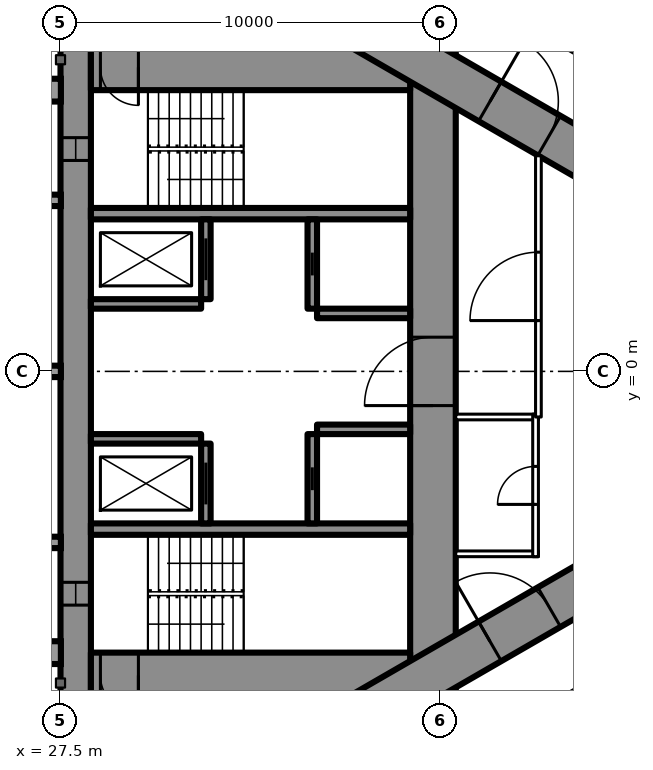
"""IFC4 building model, lengths in metres.
Left out: names, types, materials, properties, quantities, classifications, styles, units other than length and angle.
Written with IfcOpenShell. Run it as: python <this file> out.ifc"""

import sys

from ifc_helpers import new_model, si_unit, direction, frame, frame_2d, origin, place, context, subcontext, project, spatial, rectangle, extrude, element, fill, save


model = new_model("IFC4")
c1 = context("Model", 3, precision=1e-05, world=origin(), true_north=direction((0.0, 1.0)))
c2 = subcontext(c1, "Body", "Model", "MODEL_VIEW")
j1 = project(units=[si_unit("LENGTHUNIT", "METRE"), si_unit("PLANEANGLEUNIT", "RADIAN")], contexts=[c1])
p1 = place(None, origin())
s1 = spatial("IfcSite", under=j1, at=p1, CompositionType="ELEMENT")
p2 = place(p1, origin())
s2 = spatial("IfcBuilding", under=s1, at=p2, CompositionType="ELEMENT")
p3 = place(p2, frame((0.0, 0.0, 39.0)))
s3 = spatial("IfcBuildingStorey", under=s2, at=p3, CompositionType="ELEMENT", Elevation=39.0)
p4 = place(p3, frame((27.9, -8.6, 0.0), z_axis=(0.0, 0.0, 1.0), x_axis=(0.0, 1.0, 0.0)))
e1 = element("IfcWall", 1, at=p4, inside=s3, PredefinedType="SHEAR", context=c2, shape_type="SweptSolid", body=[
    extrude(rectangle(XDim=17.2, YDim=0.8, at=frame_2d((8.6, 0.0))), origin(), (0.0, 0.0, 1.0), 3.5),
])
p5 = place(p4, frame((2.45, 0.0, 0.6)))
e2 = element("IfcOpeningElement", 2, at=p5, cuts=e1, PredefinedType="OPENING", context=c2, shape_type="SweptSolid", body=[
    extrude(rectangle(XDim=0.6, YDim=2.1, at=frame_2d((0.3, 1.05))), frame((0.0, 0.41, 0.0), z_axis=(0.0, -1.0, 0.0), x_axis=(1.0, 0.0, 0.0)), (0.0, 0.0, 1.0), 0.82),
])
p6 = place(p4, frame((14.15, 0.0, 0.6)))
e3 = element("IfcOpeningElement", 3, at=p6, cuts=e1, PredefinedType="OPENING", context=c2, shape_type="SweptSolid", body=[
    extrude(rectangle(XDim=0.6, YDim=2.1, at=frame_2d((0.3, 1.05))), frame((0.0, 0.41, 0.0), z_axis=(0.0, -1.0, 0.0), x_axis=(1.0, 0.0, 0.0)), (0.0, 0.0, 1.0), 0.82),
])
p7 = place(p3, frame((37.3, -8.6, 0.0), z_axis=(0.0, 0.0, 1.0), x_axis=(0.0, 1.0, 0.0)))
e4 = element("IfcWall", 4, at=p7, inside=s3, PredefinedType="SHEAR", context=c2, shape_type="SweptSolid", body=[
    extrude(rectangle(XDim=17.2, YDim=1.2, at=frame_2d((8.6, 0.0))), origin(), (0.0, 0.0, 1.0), 3.5),
])
p8 = place(p7, frame((7.7, 0.0, 0.0)))
e5 = element("IfcOpeningElement", 5, at=p8, cuts=e4, PredefinedType="OPENING", context=c2, shape_type="SweptSolid", body=[
    extrude(rectangle(XDim=1.8, YDim=2.2, at=frame_2d((0.9, 1.1))), frame((0.0, 0.61, 0.0), z_axis=(0.0, -1.0, 0.0), x_axis=(1.0, 0.0, 0.0)), (0.0, 0.0, 1.0), 1.22),
])
p9 = place(p3, frame((28.3, -8.0, 0.0), z_axis=(0.0, 0.0, 1.0), x_axis=(1.0, 0.0, 0.0)))
e6 = element("IfcWall", 6, at=p9, inside=s3, PredefinedType="SHEAR", context=c2, shape_type="SweptSolid", body=[
    extrude(rectangle(XDim=8.4, YDim=1.2, at=frame_2d((4.2, 0.0))), origin(), (0.0, 0.0, 1.0), 3.5),
])
p10 = place(p9, frame((0.25, 0.0, 0.0)))
e7 = element("IfcOpeningElement", 7, at=p10, cuts=e6, PredefinedType="OPENING", context=c2, shape_type="SweptSolid", body=[
    extrude(rectangle(XDim=1.0, YDim=2.2, at=frame_2d((0.5, 1.1))), frame((0.0, 0.61, 0.0), z_axis=(0.0, -1.0, 0.0), x_axis=(1.0, 0.0, 0.0)), (0.0, 0.0, 1.0), 1.22),
])
p11 = place(p3, frame((28.3, 8.0, 0.0), z_axis=(0.0, 0.0, 1.0), x_axis=(1.0, 0.0, 0.0)))
e8 = element("IfcWall", 8, at=p11, inside=s3, PredefinedType="SHEAR", context=c2, shape_type="SweptSolid", body=[
    extrude(rectangle(XDim=8.4, YDim=1.2, at=frame_2d((4.2, 0.0))), origin(), (0.0, 0.0, 1.0), 3.5),
])
p12 = place(p11, frame((0.25, 0.0, 0.0)))
e9 = element("IfcOpeningElement", 9, at=p12, cuts=e8, PredefinedType="OPENING", context=c2, shape_type="SweptSolid", body=[
    extrude(rectangle(XDim=1.0, YDim=2.2, at=frame_2d((0.5, 1.1))), frame((0.0, 0.61, 0.0), z_axis=(0.0, -1.0, 0.0), x_axis=(1.0, 0.0, 0.0)), (0.0, 0.0, 1.0), 1.22),
])
for number, where, z_axis, x_axis in (
    (10, (28.3, -4.15, 0.0), (0.0, 0.0, 1.0), (1.0, 0.0, 0.0)),
    (11, (28.3, 4.15, 0.0), (0.0, 0.0, 1.0), (1.0, 0.0, 0.0)),
):
    element("IfcWall", number, at=place(p3, frame(where, z_axis=z_axis, x_axis=x_axis)), inside=s3, PredefinedType="SHEAR", context=c2, shape_type="SweptSolid", body=[
        extrude(rectangle(XDim=8.4, YDim=0.3, at=frame_2d((4.2, 0.0))), origin(), (0.0, 0.0, 1.0), 3.5),
    ])
p13 = place(p3, frame((31.325, -4.0, 0.0), z_axis=(0.0, 0.0, 1.0), x_axis=(0.0, 1.0, 0.0)))
e12 = element("IfcWall", 12, at=p13, inside=s3, PredefinedType="SHEAR", context=c2, shape_type="SweptSolid", body=[
    extrude(rectangle(XDim=2.1, YDim=0.25, at=frame_2d((1.05, 0.0))), origin(), (0.0, 0.0, 1.0), 3.5),
])
p14 = place(p13, frame((0.5, 0.0, 0.0)))
e13 = element("IfcOpeningElement", 13, at=p14, cuts=e12, PredefinedType="OPENING", context=c2, shape_type="SweptSolid", body=[
    extrude(rectangle(XDim=1.1, YDim=2.2, at=frame_2d((0.55, 1.1))), frame((0.0, 0.135, 0.0), z_axis=(0.0, -1.0, 0.0), x_axis=(1.0, 0.0, 0.0)), (0.0, 0.0, 1.0), 0.27),
])
p15 = place(p3, frame((34.125, -4.0, 0.0), z_axis=(0.0, 0.0, 1.0), x_axis=(0.0, 1.0, 0.0)))
e14 = element("IfcWall", 14, at=p15, inside=s3, PredefinedType="SHEAR", context=c2, shape_type="SweptSolid", body=[
    extrude(rectangle(XDim=2.35, YDim=0.25, at=frame_2d((1.175, 0.0))), origin(), (0.0, 0.0, 1.0), 3.5),
])
p16 = place(p15, frame((0.875, 0.0, 0.0)))
e15 = element("IfcOpeningElement", 15, at=p16, cuts=e14, PredefinedType="OPENING", context=c2, shape_type="SweptSolid", body=[
    extrude(rectangle(XDim=0.6, YDim=2.0, at=frame_2d((0.3, 1.0))), frame((0.0, 0.135, 0.0), z_axis=(0.0, -1.0, 0.0), x_axis=(1.0, 0.0, 0.0)), (0.0, 0.0, 1.0), 0.27),
])
p17 = place(p3, frame((28.3, -1.775, 0.0), z_axis=(0.0, 0.0, 1.0), x_axis=(1.0, 0.0, 0.0)))
e16 = element("IfcWall", 16, at=p17, inside=s3, PredefinedType="SHEAR", context=c2, shape_type="SweptSolid", body=[
    extrude(rectangle(XDim=2.9, YDim=0.25, at=frame_2d((1.45, 0.0))), origin(), (0.0, 0.0, 1.0), 3.5),
])
p18 = place(p3, frame((34.25, -1.525, 0.0), z_axis=(0.0, 0.0, 1.0), x_axis=(1.0, 0.0, 0.0)))
e17 = element("IfcWall", 17, at=p18, inside=s3, PredefinedType="SHEAR", context=c2, shape_type="SweptSolid", body=[
    extrude(rectangle(XDim=2.45, YDim=0.25, at=frame_2d((1.225, 0.0))), origin(), (0.0, 0.0, 1.0), 3.5),
])
p19 = place(p3, frame((31.325, 1.9, 0.0), z_axis=(0.0, 0.0, 1.0), x_axis=(0.0, 1.0, 0.0)))
e18 = element("IfcWall", 18, at=p19, inside=s3, PredefinedType="SHEAR", context=c2, shape_type="SweptSolid", body=[
    extrude(rectangle(XDim=2.1, YDim=0.25, at=frame_2d((1.05, 0.0))), origin(), (0.0, 0.0, 1.0), 3.5),
])
p20 = place(p19, frame((0.5, 0.0, 0.0)))
e19 = element("IfcOpeningElement", 19, at=p20, cuts=e18, PredefinedType="OPENING", context=c2, shape_type="SweptSolid", body=[
    extrude(rectangle(XDim=1.1, YDim=2.2, at=frame_2d((0.55, 1.1))), frame((0.0, 0.135, 0.0), z_axis=(0.0, -1.0, 0.0), x_axis=(1.0, 0.0, 0.0)), (0.0, 0.0, 1.0), 0.27),
])
p21 = place(p3, frame((34.125, 1.65, 0.0), z_axis=(0.0, 0.0, 1.0), x_axis=(0.0, 1.0, 0.0)))
e20 = element("IfcWall", 20, at=p21, inside=s3, PredefinedType="SHEAR", context=c2, shape_type="SweptSolid", body=[
    extrude(rectangle(XDim=2.35, YDim=0.25, at=frame_2d((1.175, 0.0))), origin(), (0.0, 0.0, 1.0), 3.5),
])
p22 = place(p21, frame((0.875, 0.0, 0.0)))
e21 = element("IfcOpeningElement", 21, at=p22, cuts=e20, PredefinedType="OPENING", context=c2, shape_type="SweptSolid", body=[
    extrude(rectangle(XDim=0.6, YDim=2.0, at=frame_2d((0.3, 1.0))), frame((0.0, 0.135, 0.0), z_axis=(0.0, -1.0, 0.0), x_axis=(1.0, 0.0, 0.0)), (0.0, 0.0, 1.0), 0.27),
])
p23 = place(p3, frame((28.3, 1.775, 0.0), z_axis=(0.0, 0.0, 1.0), x_axis=(1.0, 0.0, 0.0)))
e22 = element("IfcWall", 22, at=p23, inside=s3, PredefinedType="SHEAR", context=c2, shape_type="SweptSolid", body=[
    extrude(rectangle(XDim=2.9, YDim=0.25, at=frame_2d((1.45, 0.0))), origin(), (0.0, 0.0, 1.0), 3.5),
])
p24 = place(p3, frame((34.25, 1.525, 0.0), z_axis=(0.0, 0.0, 1.0), x_axis=(1.0, 0.0, 0.0)))
e23 = element("IfcWall", 23, at=p24, inside=s3, PredefinedType="SHEAR", context=c2, shape_type="SweptSolid", body=[
    extrude(rectangle(XDim=2.45, YDim=0.25, at=frame_2d((1.225, 0.0))), origin(), (0.0, 0.0, 1.0), 3.5),
])
p25 = place(p3, frame((27.2, -13.8, 0.0), z_axis=(0.0, 0.0, 1.0), x_axis=(0.866027159892, 0.499996958321, 0.0)))
e24 = element("IfcWall", 24, at=p25, inside=s3, PredefinedType="SHEAR", context=c2, shape_type="SweptSolid", body=[
    extrude(rectangle(XDim=27.947, YDim=1.2, at=frame_2d((13.973, 0.0))), origin(), (0.0, 0.0, 1.0), 3.5),
])
p26 = place(p25, frame((4.6, 0.0, 0.0)))
e25 = element("IfcOpeningElement", 25, at=p26, cuts=e24, PredefinedType="OPENING", context=c2, shape_type="SweptSolid", body=[
    extrude(rectangle(XDim=1.0, YDim=2.2, at=frame_2d((0.5, 1.1))), frame((0.0, 0.61, 0.0), z_axis=(0.0, -1.0, 0.0), x_axis=(1.0, 0.0, 0.0)), (0.0, 0.0, 1.0), 1.22),
])
p27 = place(p25, frame((13.395, 0.0, 0.0)))
e26 = element("IfcOpeningElement", 26, at=p27, cuts=e24, PredefinedType="OPENING", context=c2, shape_type="SweptSolid", body=[
    extrude(rectangle(XDim=1.8, YDim=2.2, at=frame_2d((0.9, 1.1))), frame((0.0, 0.61, 0.0), z_axis=(0.0, -1.0, 0.0), x_axis=(1.0, 0.0, 0.0)), (0.0, 0.0, 1.0), 1.22),
])
p28 = place(p3, frame((27.2, 13.8, 0.0), z_axis=(0.0, 0.0, 1.0), x_axis=(0.866024515034, -0.500001539357, 0.0)))
e27 = element("IfcWall", 27, at=p28, inside=s3, PredefinedType="SHEAR", context=c2, shape_type="SweptSolid", body=[
    extrude(rectangle(XDim=26.907, YDim=1.2, at=frame_2d((13.454, 0.0))), origin(), (0.0, 0.0, 1.0), 3.5),
])
p29 = place(p28, frame((4.6, 0.0, 0.0)))
e28 = element("IfcOpeningElement", 28, at=p29, cuts=e27, PredefinedType="OPENING", context=c2, shape_type="SweptSolid", body=[
    extrude(rectangle(XDim=1.0, YDim=2.2, at=frame_2d((0.5, 1.1))), frame((0.0, 0.61, 0.0), z_axis=(0.0, -1.0, 0.0), x_axis=(1.0, 0.0, 0.0)), (0.0, 0.0, 1.0), 1.22),
])
p30 = place(p28, frame((13.395, 0.0, 0.0)))
e29 = element("IfcOpeningElement", 29, at=p30, cuts=e27, PredefinedType="OPENING", context=c2, shape_type="SweptSolid", body=[
    extrude(rectangle(XDim=1.8, YDim=2.2, at=frame_2d((0.9, 1.1))), frame((0.0, 0.61, 0.0), z_axis=(0.0, -1.0, 0.0), x_axis=(1.0, 0.0, 0.0)), (0.0, 0.0, 1.0), 1.22),
])
p31 = place(p3, frame((37.96, -10.243, 0.0), z_axis=(0.0, 0.0, 1.0), x_axis=(0.866026429433, 0.499998223521, 0.0)))
e30 = element("IfcWall", 30, at=p31, inside=s3, PredefinedType="PARTITIONING", context=c2, shape_type="SweptSolid", body=[
    extrude(rectangle(XDim=20.487, YDim=0.2, at=frame_2d((10.243, 0.0))), origin(), (0.0, 0.0, 1.0), 3.25),
])
p32 = place(p31, frame((7.325, 0.0, 0.0)))
e31 = element("IfcOpeningElement", 31, at=p32, cuts=e30, PredefinedType="OPENING", context=c2, shape_type="SweptSolid", body=[
    extrude(rectangle(XDim=1.0, YDim=2.2, at=frame_2d((0.5, 1.1))), frame((0.0, 0.11, 0.0), z_axis=(0.0, -1.0, 0.0), x_axis=(1.0, 0.0, 0.0)), (0.0, 0.0, 1.0), 0.22),
])
p33 = place(p31, frame((18.937, 0.0, 0.0)))
e32 = element("IfcOpeningElement", 32, at=p33, cuts=e30, PredefinedType="OPENING", context=c2, shape_type="SweptSolid", body=[
    extrude(rectangle(XDim=0.95, YDim=2.2, at=frame_2d((0.475, 1.1))), frame((0.0, 0.11, 0.0), z_axis=(0.0, -1.0, 0.0), x_axis=(1.0, 0.0, 0.0)), (0.0, 0.0, 1.0), 0.22),
])
p34 = place(p31, frame((0.6, 0.0, 0.0)))
e33 = element("IfcOpeningElement", 33, at=p34, cuts=e30, PredefinedType="OPENING", context=c2, shape_type="SweptSolid", body=[
    extrude(rectangle(XDim=0.95, YDim=2.2, at=frame_2d((0.475, 1.1))), frame((0.0, 0.11, 0.0), z_axis=(0.0, -1.0, 0.0), x_axis=(1.0, 0.0, 0.0)), (0.0, 0.0, 1.0), 0.22),
])
p35 = place(p3, frame((36.834, 10.894, 0.0), z_axis=(0.0, 0.0, 1.0), x_axis=(0.866028157229, -0.499995230863, 0.0)))
e34 = element("IfcWall", 34, at=p35, inside=s3, PredefinedType="PARTITIONING", context=c2, shape_type="SweptSolid", body=[
    extrude(rectangle(XDim=21.667, YDim=0.2, at=frame_2d((10.833, 0.0))), origin(), (0.0, 0.0, 1.0), 3.25),
])
p36 = place(p35, frame((18.885, 0.0, 0.0)))
e35 = element("IfcOpeningElement", 35, at=p36, cuts=e34, PredefinedType="OPENING", context=c2, shape_type="SweptSolid", body=[
    extrude(rectangle(XDim=0.95, YDim=2.2, at=frame_2d((0.475, 1.1))), frame((0.0, 0.11, 0.0), z_axis=(0.0, -1.0, 0.0), x_axis=(1.0, 0.0, 0.0)), (0.0, 0.0, 1.0), 0.22),
])
p37 = place(p35, frame((10.212, 0.0, 0.0)))
e36 = element("IfcOpeningElement", 36, at=p37, cuts=e34, PredefinedType="OPENING", context=c2, shape_type="SweptSolid", body=[
    extrude(rectangle(XDim=0.95, YDim=2.2, at=frame_2d((0.475, 1.1))), frame((0.0, 0.11, 0.0), z_axis=(0.0, -1.0, 0.0), x_axis=(1.0, 0.0, 0.0)), (0.0, 0.0, 1.0), 0.22),
])
p38 = place(p35, frame((8.225, 0.0, 0.0)))
e37 = element("IfcOpeningElement", 37, at=p38, cuts=e34, PredefinedType="OPENING", context=c2, shape_type="SweptSolid", body=[
    extrude(rectangle(XDim=0.95, YDim=2.2, at=frame_2d((0.475, 1.1))), frame((0.0, 0.11, 0.0), z_axis=(0.0, -1.0, 0.0), x_axis=(1.0, 0.0, 0.0)), (0.0, 0.0, 1.0), 0.22),
])
p39 = place(p35, frame((1.825, 0.0, 0.0)))
e38 = element("IfcOpeningElement", 38, at=p39, cuts=e34, PredefinedType="OPENING", context=c2, shape_type="SweptSolid", body=[
    extrude(rectangle(XDim=0.95, YDim=2.2, at=frame_2d((0.475, 1.1))), frame((0.0, 0.11, 0.0), z_axis=(0.0, -1.0, 0.0), x_axis=(1.0, 0.0, 0.0)), (0.0, 0.0, 1.0), 0.22),
])
p40 = place(p35, frame((0.246, 0.0, 0.0)))
e39 = element("IfcOpeningElement", 39, at=p40, cuts=e34, PredefinedType="OPENING", context=c2, shape_type="SweptSolid", body=[
    extrude(rectangle(XDim=0.9, YDim=2.2, at=frame_2d((0.45, 1.1))), frame((0.0, 0.11, 0.0), z_axis=(0.0, -1.0, 0.0), x_axis=(1.0, 0.0, 0.0)), (0.0, 0.0, 1.0), 0.22),
])
for number, where, z_axis, x_axis in (
    (40, (37.9, -1.2, 0.0), (0.0, 0.0, 1.0), (1.0, 0.0, 0.0)),
    (41, (37.9, -4.8, 0.0), (0.0, 0.0, 1.0), (1.0, 0.0, 0.0)),
):
    element("IfcWall", number, at=place(p3, frame(where, z_axis=z_axis, x_axis=x_axis)), inside=s3, PredefinedType="PARTITIONING", context=c2, shape_type="SweptSolid", body=[
        extrude(rectangle(XDim=2.175, YDim=0.15, at=frame_2d((1.087, 0.0))), origin(), (0.0, 0.0, 1.0), 3.25),
    ])
p41 = place(p3, frame((40.0, -4.875, 0.0), z_axis=(0.0, 0.0, 1.0), x_axis=(0.0, 1.0, 0.0)))
e42 = element("IfcWall", 42, at=p41, inside=s3, PredefinedType="PARTITIONING", context=c2, shape_type="SweptSolid", body=[
    extrude(rectangle(XDim=3.75, YDim=0.15, at=frame_2d((1.875, 0.0))), origin(), (0.0, 0.0, 1.0), 3.25),
])
p42 = place(p41, frame((1.375, 0.0, 0.0)))
e43 = element("IfcOpeningElement", 43, at=p42, cuts=e42, PredefinedType="OPENING", context=c2, shape_type="SweptSolid", body=[
    extrude(rectangle(XDim=1.0, YDim=2.2, at=frame_2d((0.5, 1.1))), frame((0.0, 0.085, 0.0), z_axis=(0.0, -1.0, 0.0), x_axis=(1.0, 0.0, 0.0)), (0.0, 0.0, 1.0), 0.17),
])
p43 = place(p3, frame((40.075, -1.2, 0.0), z_axis=(0.0, 0.0, 1.0), x_axis=(0.0, 1.0, 0.0)))
e44 = element("IfcWall", 44, at=p43, inside=s3, PredefinedType="PARTITIONING", context=c2, shape_type="SweptSolid", body=[
    extrude(rectangle(XDim=6.874, YDim=0.15, at=frame_2d((3.437, 0.0))), origin(), (0.0, 0.0, 1.0), 3.25),
])
p44 = place(p43, frame((2.537, 0.0, 0.0)))
e45 = element("IfcOpeningElement", 45, at=p44, cuts=e44, PredefinedType="OPENING", context=c2, shape_type="SweptSolid", body=[
    extrude(rectangle(XDim=1.8, YDim=2.2, at=frame_2d((0.9, 1.1))), frame((0.0, 0.085, 0.0), z_axis=(0.0, -1.0, 0.0), x_axis=(1.0, 0.0, 0.0)), (0.0, 0.0, 1.0), 0.17),
])
p45 = place(p42, origin())
e46 = element("IfcDoor", 46, at=p45, inside=s3, OperationType="SINGLE_SWING_LEFT", PredefinedType="DOOR", context=c2, shape_type="SweptSolid", body=[
    extrude(rectangle(XDim=1.0, YDim=2.2, at=frame_2d((0.5, 1.1))), frame((0.0, 0.025, 0.0), z_axis=(0.0, -1.0, 0.0), x_axis=(1.0, 0.0, 0.0)), (0.0, 0.0, 1.0), 0.05),
])
fill(e43, e46)
p46 = place(p44, origin())
e47 = element("IfcDoor", 47, at=p46, inside=s3, OperationType="DOUBLE_DOOR_SINGLE_SWING", PredefinedType="DOOR", context=c2, shape_type="SweptSolid", body=[
    extrude(rectangle(XDim=1.8, YDim=2.2, at=frame_2d((0.9, 1.1))), frame((0.0, 0.025, 0.0), z_axis=(0.0, -1.0, 0.0), x_axis=(1.0, 0.0, 0.0)), (0.0, 0.0, 1.0), 0.05),
])
fill(e45, e47)
p47 = place(p27, origin())
e48 = element("IfcDoor", 48, at=p47, inside=s3, OperationType="DOUBLE_DOOR_SINGLE_SWING", PredefinedType="DOOR", context=c2, shape_type="SweptSolid", body=[
    extrude(rectangle(XDim=1.8, YDim=2.2, at=frame_2d((0.9, 1.1))), frame((0.0, 0.025, 0.0), z_axis=(0.0, -1.0, 0.0), x_axis=(1.0, 0.0, 0.0)), (0.0, 0.0, 1.0), 0.05),
])
fill(e26, e48)
p48 = place(p30, origin())
e49 = element("IfcDoor", 49, at=p48, inside=s3, OperationType="DOUBLE_DOOR_SINGLE_SWING", PredefinedType="DOOR", context=c2, shape_type="SweptSolid", body=[
    extrude(rectangle(XDim=1.8, YDim=2.2, at=frame_2d((0.9, 1.1))), frame((0.0, 0.025, 0.0), z_axis=(0.0, -1.0, 0.0), x_axis=(1.0, 0.0, 0.0)), (0.0, 0.0, 1.0), 0.05),
])
fill(e29, e49)
p49 = place(p8, origin())
e50 = element("IfcDoor", 50, at=p49, inside=s3, OperationType="DOUBLE_DOOR_SINGLE_SWING", PredefinedType="DOOR", context=c2, shape_type="SweptSolid", body=[
    extrude(rectangle(XDim=1.8, YDim=2.2, at=frame_2d((0.9, 1.1))), frame((0.0, 0.025, 0.0), z_axis=(0.0, -1.0, 0.0), x_axis=(1.0, 0.0, 0.0)), (0.0, 0.0, 1.0), 0.05),
])
fill(e5, e50)
p50 = place(p10, origin())
e51 = element("IfcDoor", 51, at=p50, inside=s3, OperationType="SINGLE_SWING_RIGHT", PredefinedType="DOOR", context=c2, shape_type="SweptSolid", body=[
    extrude(rectangle(XDim=1.0, YDim=2.2, at=frame_2d((0.5, 1.1))), frame((0.0, 0.025, 0.0), z_axis=(0.0, -1.0, 0.0), x_axis=(1.0, 0.0, 0.0)), (0.0, 0.0, 1.0), 0.05),
])
fill(e7, e51)
p51 = place(p12, origin())
e52 = element("IfcDoor", 52, at=p51, inside=s3, OperationType="SINGLE_SWING_RIGHT", PredefinedType="DOOR", context=c2, shape_type="SweptSolid", body=[
    extrude(rectangle(XDim=1.0, YDim=2.2, at=frame_2d((0.5, 1.1))), frame((0.0, 0.025, 0.0), z_axis=(0.0, -1.0, 0.0), x_axis=(1.0, 0.0, 0.0)), (0.0, 0.0, 1.0), 0.05),
])
fill(e9, e52)
p52 = place(p14, origin())
e53 = element("IfcDoor", 53, at=p52, inside=s3, OperationType="SLIDING_TO_LEFT", PredefinedType="USERDEFINED", context=c2, shape_type="SweptSolid", body=[
    extrude(rectangle(XDim=1.1, YDim=2.2, at=frame_2d((0.55, 1.1))), frame((0.0, 0.025, 0.0), z_axis=(0.0, -1.0, 0.0), x_axis=(1.0, 0.0, 0.0)), (0.0, 0.0, 1.0), 0.05),
])
fill(e13, e53)
p53 = place(p20, origin())
e54 = element("IfcDoor", 54, at=p53, inside=s3, OperationType="SLIDING_TO_LEFT", PredefinedType="USERDEFINED", context=c2, shape_type="SweptSolid", body=[
    extrude(rectangle(XDim=1.1, YDim=2.2, at=frame_2d((0.55, 1.1))), frame((0.0, 0.025, 0.0), z_axis=(0.0, -1.0, 0.0), x_axis=(1.0, 0.0, 0.0)), (0.0, 0.0, 1.0), 0.05),
])
fill(e19, e54)
p54 = place(p16, origin())
e55 = element("IfcDoor", 55, at=p54, inside=s3, OperationType="SLIDING_TO_LEFT", PredefinedType="DOOR", context=c2, shape_type="SweptSolid", body=[
    extrude(rectangle(XDim=0.6, YDim=2.0, at=frame_2d((0.3, 1.0))), frame((0.0, 0.025, 0.0), z_axis=(0.0, -1.0, 0.0), x_axis=(1.0, 0.0, 0.0)), (0.0, 0.0, 1.0), 0.05),
])
fill(e15, e55)
p55 = place(p22, origin())
e56 = element("IfcDoor", 56, at=p55, inside=s3, OperationType="SLIDING_TO_LEFT", PredefinedType="DOOR", context=c2, shape_type="SweptSolid", body=[
    extrude(rectangle(XDim=0.6, YDim=2.0, at=frame_2d((0.3, 1.0))), frame((0.0, 0.025, 0.0), z_axis=(0.0, -1.0, 0.0), x_axis=(1.0, 0.0, 0.0)), (0.0, 0.0, 1.0), 0.05),
])
fill(e21, e56)
p56 = place(p5, origin())
e57 = element("IfcWindow", 57, at=p56, inside=s3, PartitioningType="SINGLE_PANEL", PredefinedType="WINDOW", context=c2, shape_type="SweptSolid", body=[
    extrude(rectangle(XDim=0.6, YDim=2.1, at=frame_2d((0.3, 1.05))), frame((0.0, 0.03, 0.0), z_axis=(0.0, -1.0, 0.0), x_axis=(1.0, 0.0, 0.0)), (0.0, 0.0, 1.0), 0.06),
])
fill(e2, e57)
p57 = place(p6, origin())
e58 = element("IfcWindow", 58, at=p57, inside=s3, PartitioningType="SINGLE_PANEL", PredefinedType="WINDOW", context=c2, shape_type="SweptSolid", body=[
    extrude(rectangle(XDim=0.6, YDim=2.1, at=frame_2d((0.3, 1.05))), frame((0.0, 0.03, 0.0), z_axis=(0.0, -1.0, 0.0), x_axis=(1.0, 0.0, 0.0)), (0.0, 0.0, 1.0), 0.06),
])
fill(e3, e58)
save(model, sys.argv[1])
